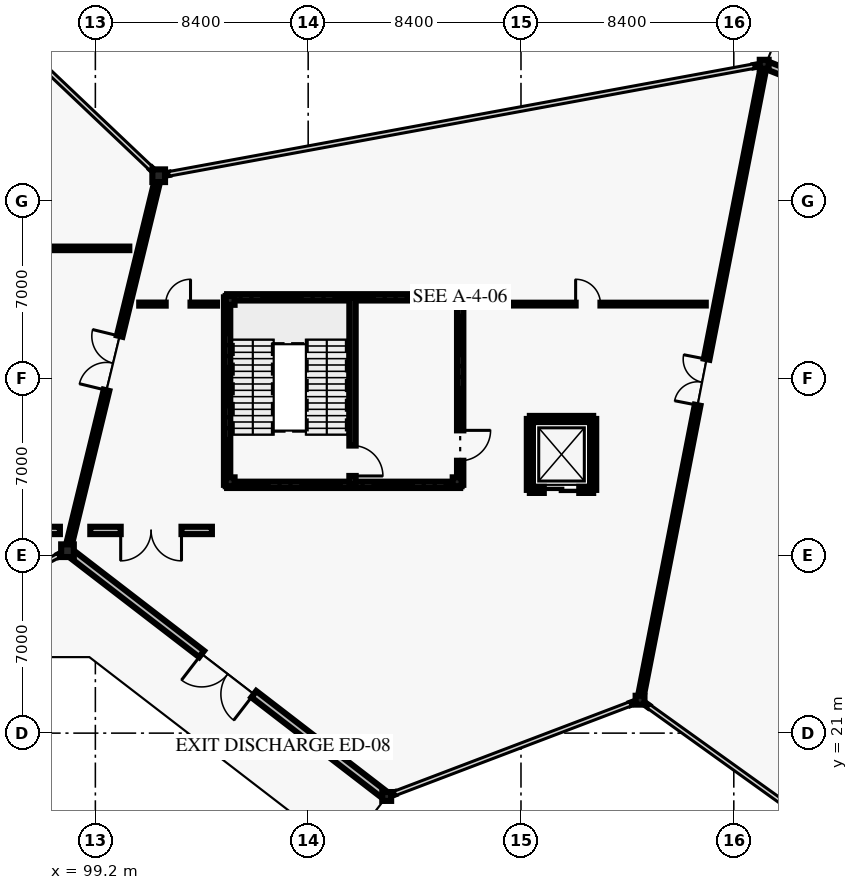
"""IFC4 building model, lengths in metres.
Left out: names, types, materials, properties, quantities, classifications, styles, units other than length and angle.
Written with IfcOpenShell. Run it as: python <this file> out.ifc"""

import sys

from ifc_helpers import new_model, si_unit, direction, frame, frame_2d, origin, origin_2d, place, context, subcontext, project, spatial, rectangle, i_section, extrude, element, fill, save


model = new_model("IFC4")
c1 = context("Model", 3, precision=1e-05, world=origin(), true_north=direction((0.0, 1.0)))
c2 = subcontext(c1, "Body", "Model", "MODEL_VIEW")
j1 = project(units=[si_unit("LENGTHUNIT", "METRE"), si_unit("PLANEANGLEUNIT", "RADIAN")], contexts=[c1])
p1 = place(None, origin())
s1 = spatial("IfcSite", under=j1, at=p1, CompositionType="ELEMENT")
p2 = place(p1, origin())
s2 = spatial("IfcBuilding", under=s1, at=p2, CompositionType="ELEMENT")
p3 = place(p2, origin())
s3 = spatial("IfcBuildingStorey", under=s2, at=p3, CompositionType="ELEMENT", Elevation=0.0)
for number, where, z_axis, x_axis in (
    (1, (98.1, 28.2, 0.0), (0.0, 0.0, 1.0), (1.0, 0.0, 0.0)),
    (2, (101.7, 43.0, 0.0), (0.0, 0.0, 1.0), (1.0, 0.0, 0.0)),
):
    element("IfcColumn", number, at=place(p3, frame(where, z_axis=z_axis, x_axis=x_axis)), inside=s3, PredefinedType="COLUMN", context=c2, shape_type="SweptSolid", body=[
        extrude(i_section(OverallWidth=0.5, OverallDepth=0.5, WebThickness=0.022, FlangeThickness=0.036, at=origin_2d()), origin(), (0.0, 0.0, 1.0), 5.4),
    ])
for number, where, z_axis, x_axis in (
    (3, (110.7, 18.5, 0.0), (0.0, 0.0, 1.0), (1.0, 0.0, 0.0)),
    (4, (120.7, 22.3, 0.0), (0.0, 0.0, 1.0), (1.0, 0.0, 0.0)),
    (5, (125.6, 47.4, 0.0), (0.0, 0.0, 1.0), (1.0, 0.0, 0.0)),
    (6, (104.52, 30.92, 0.0), (0.0, 0.0, 1.0), (1.0, 0.0, 0.0)),
    (7, (113.48, 30.92, 0.0), (0.0, 0.0, 1.0), (1.0, 0.0, 0.0)),
    (8, (113.48, 38.08, 0.0), (0.0, 0.0, 1.0), (1.0, 0.0, 0.0)),
    (9, (104.52, 38.08, 0.0), (0.0, 0.0, 1.0), (1.0, 0.0, 0.0)),
):
    element("IfcColumn", number, at=place(p3, frame(where, z_axis=z_axis, x_axis=x_axis)), inside=s3, PredefinedType="COLUMN", context=c2, shape_type="SweptSolid", body=[
        extrude(i_section(OverallWidth=0.35, OverallDepth=0.35, WebThickness=0.02, FlangeThickness=0.028, at=origin_2d()), origin(), (0.0, 0.0, 1.0), 5.4),
    ])
p4 = place(p3, frame((98.01, 28.152, 0.0), z_axis=(0.0, 0.0, 1.0), x_axis=(-0.885021600209, -0.465549962049, 0.0)))
e10 = element("IfcWall", 10, at=p4, inside=s3, PredefinedType="SOLIDWALL", context=c2, shape_type="SweptSolid", body=[
    extrude(rectangle(XDim=0.307, YDim=0.095, at=frame_2d((0.154, 0.0))), origin(), (0.0, 0.0, 1.0), 4.22),
])
p5 = place(p3, frame((101.403, 43.282, 0.0), z_axis=(0.0, 0.0, 1.0), x_axis=(0.726243974232, -0.687437044311, 0.0)))
e11 = element("IfcWall", 11, at=p5, inside=s3, PredefinedType="SOLIDWALL", context=c2, shape_type="SweptSolid", body=[
    extrude(rectangle(XDim=0.308, YDim=0.095, at=frame_2d((0.154, 0.0))), origin(), (0.0, 0.0, 1.0), 4.22),
])
p6 = place(p3, frame((110.7, 18.5, 0.0), z_axis=(0.0, 0.0, 1.0), x_axis=(-0.792411961764, 0.609986297267, 0.0)))
e12 = element("IfcWall", 12, at=p6, inside=s3, PredefinedType="SOLIDWALL", context=c2, shape_type="SweptSolid", body=[
    extrude(rectangle(XDim=15.842, YDim=0.315, at=frame_2d((7.921, 0.0))), origin(), (0.0, 0.0, 1.0), 4.22),
])
p7 = place(p6, frame((6.62, 0.0, 0.0)))
e13 = element("IfcOpeningElement", 13, at=p7, cuts=e12, PredefinedType="OPENING", context=c2, shape_type="SweptSolid", body=[
    extrude(rectangle(XDim=2.6, YDim=2.55, at=frame_2d((1.3, 1.275))), frame((0.0, 0.167, 0.0), z_axis=(0.0, -1.0, 0.0), x_axis=(1.0, 0.0, 0.0)), (0.0, 0.0, 1.0), 0.335),
])
p8 = place(p3, frame((120.605, 22.264, 0.0), z_axis=(0.0, 0.0, 1.0), x_axis=(-0.935413842844, -0.353554723651, 0.0)))
e14 = element("IfcWall", 14, at=p8, inside=s3, PredefinedType="SOLIDWALL", context=c2, shape_type="SweptSolid", body=[
    extrude(rectangle(XDim=0.308, YDim=0.095, at=frame_2d((0.154, 0.0))), origin(), (0.0, 0.0, 1.0), 4.22),
])
p9 = place(p3, frame((111.027, 18.624, 0.0), z_axis=(0.0, 0.0, 1.0), x_axis=(-0.935151489811, -0.354248064361, 0.0)))
e15 = element("IfcWall", 15, at=p9, inside=s3, PredefinedType="SOLIDWALL", context=c2, shape_type="SweptSolid", body=[
    extrude(rectangle(XDim=0.308, YDim=0.095, at=frame_2d((0.154, 0.0))), origin(), (0.0, 0.0, 1.0), 4.22),
])
for number, where, z_axis, x_axis in (
    (16, (101.8, 43.019, 0.0), (0.0, 0.0, 1.0), (0.984, 0.178, 0.0)),
    (17, (125.193, 47.325, 0.0), (0.0, 0.0, 1.0), (0.984, 0.178, 0.0)),
):
    element("IfcWall", number, at=place(p3, frame(where, z_axis=z_axis, x_axis=x_axis)), inside=s3, PredefinedType="SOLIDWALL", context=c2, shape_type="SweptSolid", body=[
        extrude(rectangle(XDim=0.308, YDim=0.095, at=frame_2d((0.154, 0.0))), origin(), (0.0, 0.0, 1.0), 4.22),
    ])
p10 = place(p3, frame((125.657, 47.378, 0.0), z_axis=(0.0, 0.0, 1.0), x_axis=(0.930068974863, -0.367384950696, 0.0)))
e18 = element("IfcWall", 18, at=p10, inside=s3, PredefinedType="SOLIDWALL", context=c2, shape_type="SweptSolid", body=[
    extrude(rectangle(XDim=12.673, YDim=0.315, at=frame_2d((6.337, 0.0))), origin(), (0.0, 0.0, 1.0), 4.22),
])
p11 = place(p10, frame((5.087, 0.0, 0.0)))
e19 = element("IfcOpeningElement", 19, at=p11, cuts=e18, PredefinedType="OPENING", context=c2, shape_type="SweptSolid", body=[
    extrude(rectangle(XDim=2.5, YDim=2.45, at=frame_2d((1.25, 1.225))), frame((0.0, 0.167, 0.0), z_axis=(0.0, -1.0, 0.0), x_axis=(1.0, 0.0, 0.0)), (0.0, 0.0, 1.0), 0.335),
])
p12 = place(p3, frame((121.033, 22.061, 0.0), z_axis=(0.0, 0.0, 1.0), x_axis=(-0.811639565077, 0.584158554162, 0.0)))
e20 = element("IfcWall", 20, at=p12, inside=s3, PredefinedType="SOLIDWALL", context=c2, shape_type="SweptSolid", body=[
    extrude(rectangle(XDim=0.308, YDim=0.095, at=frame_2d((0.154, 0.0))), origin(), (0.0, 0.0, 1.0), 4.22),
])
p13 = place(p3, frame((97.8, 29.0, 0.0), z_axis=(0.0, 0.0, 1.0), x_axis=(-1.0, 0.0, 0.0)))
e21 = element("IfcWall", 21, at=p13, inside=s3, PredefinedType="SOLIDWALL", context=c2, shape_type="SweptSolid", body=[
    extrude(rectangle(XDim=4.8, YDim=0.29, at=frame_2d((2.4, 0.0))), origin(), (0.0, 0.0, 1.0), 4.4),
])
p14 = place(p13, frame((1.2, 0.0, 0.0)))
e22 = element("IfcOpeningElement", 22, at=p14, cuts=e21, PredefinedType="OPENING", context=c2, shape_type="SweptSolid", body=[
    extrude(rectangle(XDim=2.4, YDim=2.55, at=frame_2d((1.2, 1.275))), frame((0.0, 0.155, 0.0), z_axis=(0.0, -1.0, 0.0), x_axis=(1.0, 0.0, 0.0)), (0.0, 0.0, 1.0), 0.31),
])
p15 = place(p3, frame((103.8, 29.0, 0.0), z_axis=(0.0, 0.0, 1.0), x_axis=(-1.0, 0.0, 0.0)))
e23 = element("IfcWall", 23, at=p15, inside=s3, PredefinedType="SOLIDWALL", context=c2, shape_type="SweptSolid", body=[
    extrude(rectangle(XDim=4.8, YDim=0.29, at=frame_2d((2.4, 0.0))), origin(), (0.0, 0.0, 1.0), 4.4),
])
p16 = place(p15, frame((1.2, 0.0, 0.0)))
e24 = element("IfcOpeningElement", 24, at=p16, cuts=e23, PredefinedType="OPENING", context=c2, shape_type="SweptSolid", body=[
    extrude(rectangle(XDim=2.4, YDim=2.55, at=frame_2d((1.2, 1.275))), frame((0.0, 0.155, 0.0), z_axis=(0.0, -1.0, 0.0), x_axis=(1.0, 0.0, 0.0)), (0.0, 0.0, 1.0), 0.31),
])
p17 = place(p3, frame((98.1, 28.2, 0.0), z_axis=(0.0, 0.0, 1.0), x_axis=(0.236341762997, 0.971669990822, 0.0)))
e25 = element("IfcWall", 25, at=p17, inside=s3, PredefinedType="SOLIDWALL", context=c2, shape_type="SweptSolid", body=[
    extrude(rectangle(XDim=15.231, YDim=0.225, at=frame_2d((7.616, 0.0))), origin(), (0.0, 0.0, 1.0), 4.62),
])
p18 = place(p17, frame((6.516, 0.0, 0.0)))
e26 = element("IfcOpeningElement", 26, at=p18, cuts=e25, PredefinedType="OPENING", context=c2, shape_type="SweptSolid", body=[
    extrude(rectangle(XDim=2.2, YDim=2.6, at=frame_2d((1.1, 1.3))), frame((0.0, 0.123, 0.0), z_axis=(0.0, -1.0, 0.0), x_axis=(1.0, 0.0, 0.0)), (0.0, 0.0, 1.0), 0.245),
])
p19 = place(p3, frame((120.7, 22.3, 0.0), z_axis=(0.0, 0.0, 1.0), x_axis=(0.191608827438, 0.981471373626, 0.0)))
e27 = element("IfcWall", 27, at=p19, inside=s3, PredefinedType="SOLIDWALL", context=c2, shape_type="SweptSolid", body=[
    extrude(rectangle(XDim=25.574, YDim=0.225, at=frame_2d((12.787, 0.0))), origin(), (0.0, 0.0, 1.0), 4.62),
])
p20 = place(p19, frame((11.862, 0.0, 0.0)))
e28 = element("IfcOpeningElement", 28, at=p20, cuts=e27, PredefinedType="OPENING", context=c2, shape_type="SweptSolid", body=[
    extrude(rectangle(XDim=1.85, YDim=2.4, at=frame_2d((0.925, 1.2))), frame((0.0, 0.123, 0.0), z_axis=(0.0, -1.0, 0.0), x_axis=(1.0, 0.0, 0.0)), (0.0, 0.0, 1.0), 0.245),
])
p21 = place(p3, frame((77.95, 40.133, 0.0), z_axis=(0.0, 0.0, 1.0), x_axis=(1.0, 0.0, 0.0)))
e29 = element("IfcWall", 29, at=p21, inside=s3, PredefinedType="PARTITIONING", context=c2, shape_type="SweptSolid", body=[
    extrude(rectangle(XDim=22.59, YDim=0.14, at=frame_2d((11.295, 0.0))), origin(), (0.0, 0.0, 1.0), 3.92),
])
p22 = place(p21, frame((10.835, 0.0, 0.0)))
e30 = element("IfcOpeningElement", 30, at=p22, cuts=e29, PredefinedType="OPENING", context=c2, shape_type="SweptSolid", body=[
    extrude(rectangle(XDim=0.92, YDim=2.1, at=frame_2d((0.46, 1.05))), frame((0.0, 0.08, 0.0), z_axis=(0.0, -1.0, 0.0), x_axis=(1.0, 0.0, 0.0)), (0.0, 0.0, 1.0), 0.16),
])
p23 = place(p3, frame((100.931, 37.933, 0.0), z_axis=(0.0, 0.0, 1.0), x_axis=(1.0, 0.0, 0.0)))
e31 = element("IfcWall", 31, at=p23, inside=s3, PredefinedType="PARTITIONING", context=c2, shape_type="SweptSolid", body=[
    extrude(rectangle(XDim=3.069, YDim=0.12, at=frame_2d((1.535, 0.0))), origin(), (0.0, 0.0, 1.0), 3.92),
])
p24 = place(p23, frame((1.045, 0.0, 0.0)))
e32 = element("IfcOpeningElement", 32, at=p24, cuts=e31, PredefinedType="OPENING", context=c2, shape_type="SweptSolid", body=[
    extrude(rectangle(XDim=0.98, YDim=2.15, at=frame_2d((0.49, 1.075))), frame((0.0, 0.07, 0.0), z_axis=(0.0, -1.0, 0.0), x_axis=(1.0, 0.0, 0.0)), (0.0, 0.0, 1.0), 0.14),
])
p25 = place(p3, frame((114.0, 37.933, 0.0), z_axis=(0.0, 0.0, 1.0), x_axis=(1.0, 0.0, 0.0)))
e33 = element("IfcWall", 33, at=p25, inside=s3, PredefinedType="PARTITIONING", context=c2, shape_type="SweptSolid", body=[
    extrude(rectangle(XDim=9.293, YDim=0.11, at=frame_2d((4.646, 0.0))), origin(), (0.0, 0.0, 1.0), 3.92),
])
p26 = place(p25, frame((4.157, 0.0, 0.0)))
e34 = element("IfcOpeningElement", 34, at=p26, cuts=e33, PredefinedType="OPENING", context=c2, shape_type="SweptSolid", body=[
    extrude(rectangle(XDim=0.98, YDim=2.15, at=frame_2d((0.49, 1.075))), frame((0.0, 0.065, 0.0), z_axis=(0.0, -1.0, 0.0), x_axis=(1.0, 0.0, 0.0)), (0.0, 0.0, 1.0), 0.13),
])
p27 = place(p3, frame((104.4, 30.8, 0.0), z_axis=(0.0, 0.0, 1.0), x_axis=(0.0, 1.0, 0.0)))
e35 = element("IfcWall", 35, at=p27, inside=s3, PredefinedType="SHEAR", context=c2, shape_type="SweptSolid", body=[
    extrude(rectangle(XDim=7.4, YDim=0.25, at=frame_2d((3.7, 0.0))), origin(), (0.0, 0.0, 1.0), 5.16),
])
for number, where, z_axis, x_axis in (
    (36, (104.4, 38.2, 0.0), (0.0, 0.0, 1.0), (1.0, 0.0, 0.0)),
    (37, (113.6, 30.8, 0.0), (0.0, 0.0, 1.0), (-1.0, 0.0, 0.0)),
):
    element("IfcWall", number, at=place(p3, frame(where, z_axis=z_axis, x_axis=x_axis)), inside=s3, PredefinedType="SHEAR", context=c2, shape_type="SweptSolid", body=[
        extrude(rectangle(XDim=9.2, YDim=0.25, at=frame_2d((4.6, 0.0))), origin(), (0.0, 0.0, 1.0), 5.16),
    ])
p28 = place(p3, frame((113.6, 38.2, 0.0), z_axis=(0.0, 0.0, 1.0), x_axis=(0.0, -1.0, 0.0)))
e38 = element("IfcWall", 38, at=p28, inside=s3, PredefinedType="SHEAR", context=c2, shape_type="SweptSolid", body=[
    extrude(rectangle(XDim=7.4, YDim=0.25, at=frame_2d((3.7, 0.0))), origin(), (0.0, 0.0, 1.0), 5.16),
])
p29 = place(p28, frame((5.25, 0.0, 0.0)))
e39 = element("IfcOpeningElement", 39, at=p29, cuts=e38, PredefinedType="OPENING", context=c2, shape_type="SweptSolid", body=[
    extrude(rectangle(XDim=1.2, YDim=2.2, at=frame_2d((0.6, 1.1))), frame((0.0, 0.135, 0.0), z_axis=(0.0, -1.0, 0.0), x_axis=(1.0, 0.0, 0.0)), (0.0, 0.0, 1.0), 0.27),
])
p30 = place(p3, frame((109.35, 38.2, 0.0), z_axis=(0.0, 0.0, 1.0), x_axis=(0.0, -1.0, 0.0)))
e40 = element("IfcWall", 40, at=p30, inside=s3, PredefinedType="SHEAR", context=c2, shape_type="SweptSolid", body=[
    extrude(rectangle(XDim=7.4, YDim=0.25, at=frame_2d((3.7, 0.0))), origin(), (0.0, 0.0, 1.0), 5.16),
])
p31 = place(p30, frame((5.85, 0.0, 0.0)))
e41 = element("IfcOpeningElement", 41, at=p31, cuts=e40, PredefinedType="OPENING", context=c2, shape_type="SweptSolid", body=[
    extrude(rectangle(XDim=1.2, YDim=2.2, at=frame_2d((0.6, 1.1))), frame((0.0, 0.135, 0.0), z_axis=(0.0, -1.0, 0.0), x_axis=(1.0, 0.0, 0.0)), (0.0, 0.0, 1.0), 0.27),
])
p32 = place(p3, frame((116.35, 33.4, 0.0), z_axis=(0.0, 0.0, 1.0), x_axis=(1.0, 0.0, 0.0)))
e42 = element("IfcWall", 42, at=p32, inside=s3, PredefinedType="SHEAR", context=c2, shape_type="SweptSolid", body=[
    extrude(rectangle(XDim=2.5, YDim=0.24, at=frame_2d((1.25, 0.0))), origin(), (0.0, 0.0, 1.0), 5.16),
])
for number, where, z_axis, x_axis in (
    (43, (118.85, 33.4, 0.0), (0.0, 0.0, 1.0), (0.0, -1.0, 0.0)),
    (44, (116.35, 30.6, 0.0), (0.0, 0.0, 1.0), (0.0, 1.0, 0.0)),
):
    element("IfcWall", number, at=place(p3, frame(where, z_axis=z_axis, x_axis=x_axis)), inside=s3, PredefinedType="SHEAR", context=c2, shape_type="SweptSolid", body=[
        extrude(rectangle(XDim=2.8, YDim=0.24, at=frame_2d((1.4, 0.0))), origin(), (0.0, 0.0, 1.0), 5.16),
    ])
p33 = place(p3, frame((118.85, 30.6, 0.0), z_axis=(0.0, 0.0, 1.0), x_axis=(-1.0, 0.0, 0.0)))
e45 = element("IfcWall", 45, at=p33, inside=s3, PredefinedType="SHEAR", context=c2, shape_type="SweptSolid", body=[
    extrude(rectangle(XDim=2.5, YDim=0.24, at=frame_2d((1.25, 0.0))), origin(), (0.0, 0.0, 1.0), 5.16),
])
p34 = place(p33, frame((0.55, 0.0, 0.0)))
e46 = element("IfcOpeningElement", 46, at=p34, cuts=e45, PredefinedType="OPENING", context=c2, shape_type="SweptSolid", body=[
    extrude(rectangle(XDim=1.4, YDim=2.3, at=frame_2d((0.7, 1.15))), frame((0.0, 0.13, 0.0), z_axis=(0.0, -1.0, 0.0), x_axis=(1.0, 0.0, 0.0)), (0.0, 0.0, 1.0), 0.26),
])
p35 = place(p7, origin())
e47 = element("IfcDoor", 47, at=p35, inside=s3, OperationType="DOUBLE_DOOR_SINGLE_SWING", PredefinedType="DOOR", context=c2, shape_type="SweptSolid", body=[
    extrude(rectangle(XDim=2.6, YDim=2.55, at=frame_2d((1.3, 1.275))), frame((0.0, 0.025, 0.0), z_axis=(0.0, -1.0, 0.0), x_axis=(1.0, 0.0, 0.0)), (0.0, 0.0, 1.0), 0.05),
])
fill(e13, e47)
p36 = place(p16, origin())
e48 = element("IfcDoor", 48, at=p36, inside=s3, OperationType="DOUBLE_DOOR_SINGLE_SWING", PredefinedType="DOOR", context=c2, shape_type="SweptSolid", body=[
    extrude(rectangle(XDim=2.4, YDim=2.55, at=frame_2d((1.2, 1.275))), frame((0.0, 0.025, 0.0), z_axis=(0.0, -1.0, 0.0), x_axis=(1.0, 0.0, 0.0)), (0.0, 0.0, 1.0), 0.05),
])
fill(e24, e48)
p37 = place(p18, origin())
e49 = element("IfcDoor", 49, at=p37, inside=s3, OperationType="DOUBLE_DOOR_SINGLE_SWING", PredefinedType="DOOR", context=c2, shape_type="SweptSolid", body=[
    extrude(rectangle(XDim=2.2, YDim=2.6, at=frame_2d((1.1, 1.3))), frame((0.0, 0.025, 0.0), z_axis=(0.0, -1.0, 0.0), x_axis=(1.0, 0.0, 0.0)), (0.0, 0.0, 1.0), 0.05),
])
fill(e26, e49)
p38 = place(p20, origin())
e50 = element("IfcDoor", 50, at=p38, inside=s3, OperationType="DOUBLE_DOOR_SINGLE_SWING", PredefinedType="DOOR", context=c2, shape_type="SweptSolid", body=[
    extrude(rectangle(XDim=1.85, YDim=2.4, at=frame_2d((0.925, 1.2))), frame((0.0, 0.025, 0.0), z_axis=(0.0, -1.0, 0.0), x_axis=(1.0, 0.0, 0.0)), (0.0, 0.0, 1.0), 0.05),
])
fill(e28, e50)
p39 = place(p24, origin())
e51 = element("IfcDoor", 51, at=p39, inside=s3, OperationType="SINGLE_SWING_RIGHT", PredefinedType="DOOR", context=c2, shape_type="SweptSolid", body=[
    extrude(rectangle(XDim=0.98, YDim=2.15, at=frame_2d((0.49, 1.075))), frame((0.0, 0.025, 0.0), z_axis=(0.0, -1.0, 0.0), x_axis=(1.0, 0.0, 0.0)), (0.0, 0.0, 1.0), 0.05),
])
fill(e32, e51)
p40 = place(p26, origin())
e52 = element("IfcDoor", 52, at=p40, inside=s3, OperationType="SINGLE_SWING_LEFT", PredefinedType="DOOR", context=c2, shape_type="SweptSolid", body=[
    extrude(rectangle(XDim=0.98, YDim=2.15, at=frame_2d((0.49, 1.075))), frame((0.0, 0.025, 0.0), z_axis=(0.0, -1.0, 0.0), x_axis=(1.0, 0.0, 0.0)), (0.0, 0.0, 1.0), 0.05),
])
fill(e34, e52)
p41 = place(p29, origin())
e53 = element("IfcDoor", 53, at=p41, inside=s3, OperationType="SINGLE_SWING_LEFT", PredefinedType="DOOR", context=c2, shape_type="SweptSolid", body=[
    extrude(rectangle(XDim=1.2, YDim=2.2, at=frame_2d((0.6, 1.1))), frame((0.0, 0.025, 0.0), z_axis=(0.0, -1.0, 0.0), x_axis=(1.0, 0.0, 0.0)), (0.0, 0.0, 1.0), 0.05),
])
fill(e39, e53)
p42 = place(p31, origin())
e54 = element("IfcDoor", 54, at=p42, inside=s3, OperationType="SINGLE_SWING_RIGHT", PredefinedType="DOOR", context=c2, shape_type="SweptSolid", body=[
    extrude(rectangle(XDim=1.2, YDim=2.2, at=frame_2d((0.6, 1.1))), frame((0.0, 0.025, 0.0), z_axis=(0.0, -1.0, 0.0), x_axis=(1.0, 0.0, 0.0)), (0.0, 0.0, 1.0), 0.05),
])
fill(e41, e54)
p43 = place(p34, origin())
e55 = element("IfcDoor", 55, at=p43, inside=s3, OperationType="SLIDING_TO_LEFT", PredefinedType="DOOR", context=c2, shape_type="SweptSolid", body=[
    extrude(rectangle(XDim=1.4, YDim=2.3, at=frame_2d((0.7, 1.15))), frame((0.0, 0.025, 0.0), z_axis=(0.0, -1.0, 0.0), x_axis=(1.0, 0.0, 0.0)), (0.0, 0.0, 1.0), 0.05),
])
fill(e46, e55)
save(model, sys.argv[1])
